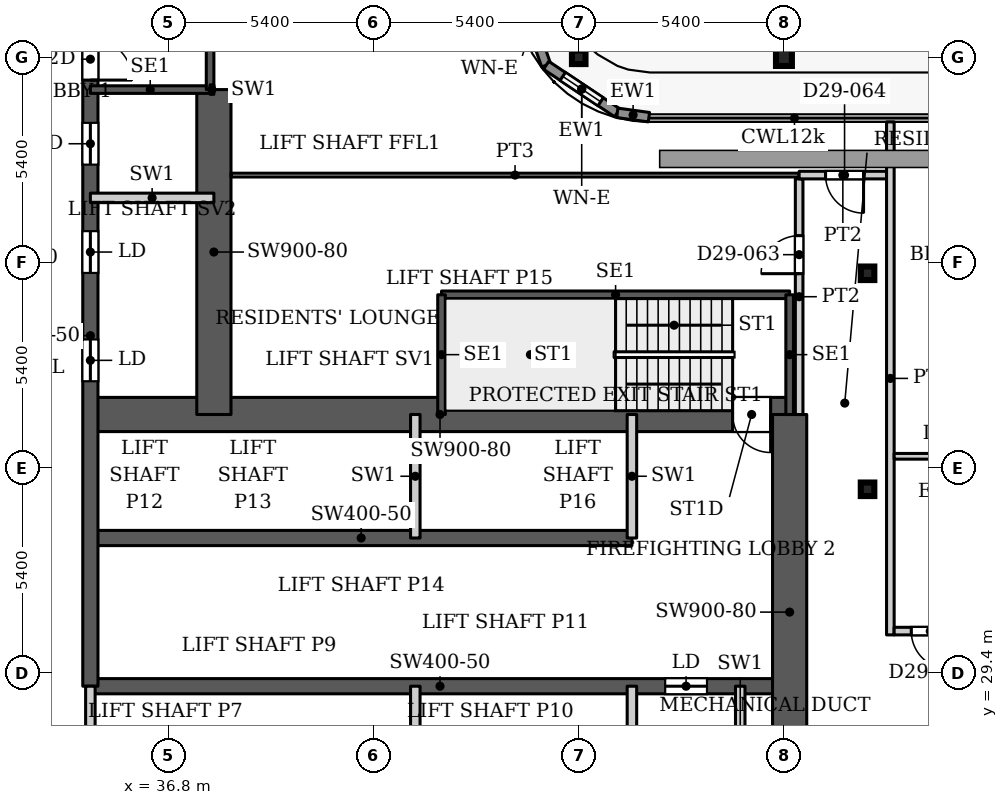
"""IFC4 building model, lengths in metres.
Left out: names, types, materials, properties, quantities, classifications, styles, units other than length and angle.
Written with IfcOpenShell. Run it as: python <this file> out.ifc"""

import sys

from ifc_helpers import new_model, si_unit, direction, frame, frame_2d, origin, origin_2d, place, context, subcontext, project, spatial, rectangle, hollow_rectangle, i_section, extrude, source, transform, mapped, element, fill, save


model = new_model("IFC4")
c1 = context("Model", 3, precision=1e-05, world=origin(), true_north=direction((0.0, 1.0)))
c2 = subcontext(c1, "Body", "Model", "MODEL_VIEW")
j1 = project(units=[si_unit("LENGTHUNIT", "METRE"), si_unit("PLANEANGLEUNIT", "RADIAN")], contexts=[c1])
p1 = place(None, origin())
s1 = spatial("IfcSite", under=j1, at=p1, CompositionType="ELEMENT")
p2 = place(p1, origin())
s2 = spatial("IfcBuilding", under=s1, at=p2, CompositionType="ELEMENT")
p3 = place(p2, frame((0.0, 0.0, 125.3)))
s3 = spatial("IfcBuildingStorey", under=s2, at=p3, CompositionType="ELEMENT", Elevation=125.3)
p4 = place(p3, frame((53.0, 45.6, 0.0), z_axis=(0.0, 0.0, 1.0), x_axis=(1.0, 0.0, 0.0)))
e1 = element("IfcColumn", 1, at=p4, inside=s3, PredefinedType="COLUMN", context=c2, shape_type="SweptSolid", body=[
    extrude(i_section(OverallWidth=0.418, OverallDepth=0.455, WebThickness=0.042, FlangeThickness=0.068, FilletRadius=0.014, at=origin_2d()), origin(), (0.0, 0.0, 1.0), 3.9),
])
for number, where, z_axis, x_axis in (
    (2, (55.2, 34.232, 0.0), (0.0, 0.0, 1.0), (1.0, 0.0, 0.0)),
    (3, (55.2, 39.916, 0.0), (0.0, 0.0, 1.0), (1.0, 0.0, 0.0)),
    (4, (47.6, 45.6, 0.0), (0.0, 0.0, 1.0), (1.0, 0.0, 0.0)),
):
    element("IfcColumn", number, at=place(p3, frame(where, z_axis=z_axis, x_axis=x_axis)), inside=s3, PredefinedType="COLUMN", context=c2, shape_type="SweptSolid", body=[
        extrude(hollow_rectangle(XDim=0.356, YDim=0.356, WallThickness=0.016, InnerFilletRadius=0.016, OuterFilletRadius=0.032, at=origin_2d()), origin(), (0.0, 0.0, 1.0), 3.9),
    ])
p5 = place(p3, frame((34.75, 29.05, 0.0), z_axis=(0.0, 0.0, 1.0), x_axis=(1.0, 0.0, 0.0)))
e5 = element("IfcWall", 5, at=p5, inside=s3, PredefinedType="SHEAR", context=c2, shape_type="SweptSolid", body=[
    extrude(rectangle(XDim=18.4, YDim=0.4, at=frame_2d((9.2, 0.0))), origin(), (0.0, 0.0, 1.0), 3.9),
])
p6 = place(p5, frame((15.125, 0.0, 0.0)))
e6 = element("IfcOpeningElement", 6, at=p6, cuts=e5, PredefinedType="OPENING", context=c2, shape_type="SweptSolid", body=[
    extrude(rectangle(XDim=1.1, YDim=2.2, at=frame_2d((0.55, 1.1))), frame((0.0, 0.21, 0.0), z_axis=(0.0, -1.0, 0.0), x_axis=(1.0, 0.0, 0.0)), (0.0, 0.0, 1.0), 0.42),
])
p7 = place(p3, frame((34.75, 32.95, 0.0), z_axis=(0.0, 0.0, 1.0), x_axis=(1.0, 0.0, 0.0)))
e7 = element("IfcWall", 7, at=p7, inside=s3, PredefinedType="SHEAR", context=c2, shape_type="SweptSolid", body=[
    extrude(rectangle(XDim=14.25, YDim=0.4, at=frame_2d((7.125, 0.0))), origin(), (0.0, 0.0, 1.0), 3.9),
])
p8 = place(p3, frame((34.75, 36.2, 0.0), z_axis=(0.0, 0.0, 1.0), x_axis=(1.0, 0.0, 0.0)))
e8 = element("IfcWall", 8, at=p8, inside=s3, PredefinedType="SHEAR", context=c2, shape_type="SweptSolid", body=[
    extrude(rectangle(XDim=18.4, YDim=0.9, at=frame_2d((9.2, 0.0))), origin(), (0.0, 0.0, 1.0), 3.9),
])
p9 = place(p8, frame((16.9, 0.0, 0.0)))
e9 = element("IfcOpeningElement", 9, at=p9, cuts=e8, PredefinedType="OPENING", context=c2, shape_type="SweptSolid", body=[
    extrude(rectangle(XDim=1.0, YDim=2.2, at=frame_2d((0.5, 1.1))), frame((0.0, 0.46, 0.0), z_axis=(0.0, -1.0, 0.0), x_axis=(1.0, 0.0, 0.0)), (0.0, 0.0, 1.0), 0.92),
])
p10 = place(p3, frame((34.75, 29.05, 0.0), z_axis=(0.0, 0.0, 1.0), x_axis=(0.0, 1.0, 0.0)))
e10 = element("IfcWall", 10, at=p10, inside=s3, PredefinedType="SHEAR", context=c2, shape_type="SweptSolid", body=[
    extrude(rectangle(XDim=18.45, YDim=0.4, at=frame_2d((9.225, 0.0))), origin(), (0.0, 0.0, 1.0), 3.9),
])
p11 = place(p10, frame((8.025, 0.0, 0.0)))
e11 = element("IfcOpeningElement", 11, at=p11, cuts=e10, PredefinedType="OPENING", context=c2, shape_type="SweptSolid", body=[
    extrude(rectangle(XDim=1.1, YDim=2.2, at=frame_2d((0.55, 1.1))), frame((0.0, 0.21, 0.0), z_axis=(0.0, -1.0, 0.0), x_axis=(1.0, 0.0, 0.0)), (0.0, 0.0, 1.0), 0.42),
])
p12 = place(p10, frame((10.875, 0.0, 0.0)))
e12 = element("IfcOpeningElement", 12, at=p12, cuts=e10, PredefinedType="OPENING", context=c2, shape_type="SweptSolid", body=[
    extrude(rectangle(XDim=1.1, YDim=2.2, at=frame_2d((0.55, 1.1))), frame((0.0, 0.21, 0.0), z_axis=(0.0, -1.0, 0.0), x_axis=(1.0, 0.0, 0.0)), (0.0, 0.0, 1.0), 0.42),
])
p13 = place(p10, frame((13.725, 0.0, 0.0)))
e13 = element("IfcOpeningElement", 13, at=p13, cuts=e10, PredefinedType="OPENING", context=c2, shape_type="SweptSolid", body=[
    extrude(rectangle(XDim=1.1, YDim=2.2, at=frame_2d((0.55, 1.1))), frame((0.0, 0.21, 0.0), z_axis=(0.0, -1.0, 0.0), x_axis=(1.0, 0.0, 0.0)), (0.0, 0.0, 1.0), 0.42),
])
p14 = place(p10, frame((15.95, 0.0, 0.0)))
e14 = element("IfcOpeningElement", 14, at=p14, cuts=e10, PredefinedType="OPENING", context=c2, shape_type="SweptSolid", body=[
    extrude(rectangle(XDim=1.1, YDim=2.2, at=frame_2d((0.55, 1.1))), frame((0.0, 0.21, 0.0), z_axis=(0.0, -1.0, 0.0), x_axis=(1.0, 0.0, 0.0)), (0.0, 0.0, 1.0), 0.42),
])
p15 = place(p3, frame((38.0, 36.2, 0.0), z_axis=(0.0, 0.0, 1.0), x_axis=(0.0, 1.0, 0.0)))
e15 = element("IfcWall", 15, at=p15, inside=s3, PredefinedType="SHEAR", context=c2, shape_type="SweptSolid", body=[
    extrude(rectangle(XDim=8.55, YDim=0.9, at=frame_2d((4.275, 0.0))), origin(), (0.0, 0.0, 1.0), 3.9),
])
p16 = place(p3, frame((53.15, 25.8, 0.0), z_axis=(0.0, 0.0, 1.0), x_axis=(0.0, 1.0, 0.0)))
e16 = element("IfcWall", 16, at=p16, inside=s3, PredefinedType="SHEAR", context=c2, shape_type="SweptSolid", body=[
    extrude(rectangle(XDim=10.4, YDim=0.9, at=frame_2d((5.2, 0.0))), origin(), (0.0, 0.0, 1.0), 3.9),
])
p17 = place(p3, frame((46.018, 47.471, 0.0), z_axis=(0.0, 0.0, 1.0), x_axis=(0.328791208903, -0.944402637093, 0.0)))
e17 = element("IfcWall", 17, at=p17, inside=s3, PredefinedType="SOLIDWALL", context=c2, shape_type="SweptSolid", body=[
    extrude(rectangle(XDim=2.205, YDim=0.25, at=frame_2d((1.102, 0.0))), origin(), (0.0, 0.0, 1.0), 3.75),
])
p18 = place(p17, frame((0.503, 0.0, 0.6)))
e18 = element("IfcOpeningElement", 18, at=p18, cuts=e17, PredefinedType="OPENING", context=c2, shape_type="SweptSolid", body=[
    extrude(rectangle(XDim=1.2, YDim=2.1, at=frame_2d((0.6, 1.05))), frame((0.0, 0.135, 0.0), z_axis=(0.0, -1.0, 0.0), x_axis=(1.0, 0.0, 0.0)), (0.0, 0.0, 1.0), 0.27),
])
p19 = place(p3, frame((46.743, 45.389, 0.0), z_axis=(0.0, 0.0, 1.0), x_axis=(0.831449265529, -0.555600682912, 0.0)))
e19 = element("IfcWall", 19, at=p19, inside=s3, PredefinedType="SOLIDWALL", context=c2, shape_type="SweptSolid", body=[
    extrude(rectangle(XDim=2.251, YDim=0.25, at=frame_2d((1.126, 0.0))), origin(), (0.0, 0.0, 1.0), 3.75),
])
p20 = place(p19, frame((0.525, 0.0, 0.6)))
e20 = element("IfcOpeningElement", 20, at=p20, cuts=e19, PredefinedType="OPENING", context=c2, shape_type="SweptSolid", body=[
    extrude(rectangle(XDim=1.2, YDim=2.1, at=frame_2d((0.6, 1.05))), frame((0.0, 0.135, 0.0), z_axis=(0.0, -1.0, 0.0), x_axis=(1.0, 0.0, 0.0)), (0.0, 0.0, 1.0), 0.27),
])
p21 = place(p3, frame((48.615, 44.138, 0.0), z_axis=(0.0, 0.0, 1.0), x_axis=(0.990741504246, -0.135761819977, 0.0)))
e21 = element("IfcWall", 21, at=p21, inside=s3, PredefinedType="SOLIDWALL", context=c2, shape_type="SweptSolid", body=[
    extrude(rectangle(XDim=0.84, YDim=0.25, at=frame_2d((0.42, 0.0))), origin(), (0.0, 0.0, 1.0), 3.75),
])
p22 = place(p3, frame((43.99, 39.35, 0.0), z_axis=(0.0, 0.0, 1.0), x_axis=(1.0, 0.0, 0.0)))
e22 = element("IfcWall", 22, at=p22, inside=s3, PredefinedType="SHEAR", context=c2, shape_type="SweptSolid", body=[
    extrude(rectangle(XDim=9.16, YDim=0.2, at=frame_2d((4.58, 0.0))), origin(), (0.0, 0.0, 1.0), 3.9),
])
for number, where, z_axis, x_axis in (
    (23, (43.99, 36.2, 0.0), (0.0, 0.0, 1.0), (0.0, 1.0, 0.0)),
    (24, (53.15, 36.2, 0.0), (0.0, 0.0, 1.0), (0.0, 1.0, 0.0)),
):
    element("IfcWall", number, at=place(p3, frame(where, z_axis=z_axis, x_axis=x_axis)), inside=s3, PredefinedType="SHEAR", context=c2, shape_type="SweptSolid", body=[
        extrude(rectangle(XDim=3.15, YDim=0.2, at=frame_2d((1.575, 0.0))), origin(), (0.0, 0.0, 1.0), 3.9),
    ])
p23 = place(p3, frame((34.75, 44.75, 0.0), z_axis=(0.0, 0.0, 1.0), x_axis=(1.0, 0.0, 0.0)))
e25 = element("IfcWall", 25, at=p23, inside=s3, PredefinedType="SHEAR", context=c2, shape_type="SweptSolid", body=[
    extrude(rectangle(XDim=3.15, YDim=0.2, at=frame_2d((1.575, 0.0))), origin(), (0.0, 0.0, 1.0), 3.9),
])
p24 = place(p3, frame((37.9, 44.75, 0.0), z_axis=(0.0, 0.0, 1.0), x_axis=(0.0, 1.0, 0.0)))
e26 = element("IfcWall", 26, at=p24, inside=s3, PredefinedType="SHEAR", context=c2, shape_type="SweptSolid", body=[
    extrude(rectangle(XDim=9.16, YDim=0.2, at=frame_2d((4.58, 0.0))), origin(), (0.0, 0.0, 1.0), 3.9),
])
for number, where, z_axis, x_axis in (
    (27, (34.75, 25.8, 0.0), (0.0, 0.0, 1.0), (0.0, 1.0, 0.0)),
    (28, (43.3, 25.8, 0.0), (0.0, 0.0, 1.0), (0.0, 1.0, 0.0)),
    (29, (43.3, 32.95, 0.0), (0.0, 0.0, 1.0), (0.0, 1.0, 0.0)),
    (30, (49.0, 25.8, 0.0), (0.0, 0.0, 1.0), (0.0, 1.0, 0.0)),
    (31, (49.0, 32.95, 0.0), (0.0, 0.0, 1.0), (0.0, 1.0, 0.0)),
    (32, (51.85, 25.8, 0.0), (0.0, 0.0, 1.0), (0.0, 1.0, 0.0)),
    (33, (34.75, 41.9, 0.0), (0.0, 0.0, 1.0), (1.0, 0.0, 0.0)),
):
    element("IfcWall", number, at=place(p3, frame(where, z_axis=z_axis, x_axis=x_axis)), inside=s3, PredefinedType="PARTITIONING", context=c2, shape_type="SweptSolid", body=[
        extrude(rectangle(XDim=3.25, YDim=0.25, at=frame_2d((1.625, 0.0))), origin(), (0.0, 0.0, 1.0), 3.9),
    ])
p25 = place(p3, frame((37.9, 44.75, 0.0), z_axis=(0.0, 0.0, 1.0), x_axis=(1.0, 0.0, 0.0)))
e34 = element("IfcWall", 34, at=p25, inside=s3, PredefinedType="PARTITIONING", context=c2, shape_type="SweptSolid", body=[
    extrude(rectangle(XDim=0.1, YDim=0.25, at=frame_2d((0.05, 0.0))), origin(), (0.0, 0.0, 1.0), 3.9),
])
p26 = place(p3, frame((38.449, 42.5, 0.0), z_axis=(0.0, 0.0, 1.0), x_axis=(1.0, 0.0, 0.0)))
e35 = element("IfcWall", 35, at=p26, inside=s3, PredefinedType="PARTITIONING", context=c2, shape_type="SweptSolid", body=[
    extrude(rectangle(XDim=14.951, YDim=0.1, at=frame_2d((7.476, 0.0))), origin(), (0.0, 0.0, 1.0), 3.6),
])
p27 = place(p3, frame((53.4, 36.199, 0.0), z_axis=(0.0, 0.0, 1.0), x_axis=(0.0, 1.0, 0.0)))
e36 = element("IfcWall", 36, at=p27, inside=s3, PredefinedType="PARTITIONING", context=c2, shape_type="SweptSolid", body=[
    extrude(rectangle(XDim=6.201, YDim=0.2, at=frame_2d((3.101, 0.0))), origin(), (0.0, 0.0, 1.0), 3.6),
])
p28 = place(p27, frame((3.707, 0.0, 0.0)))
e37 = element("IfcOpeningElement", 37, at=p28, cuts=e36, PredefinedType="OPENING", context=c2, shape_type="SweptSolid", body=[
    extrude(rectangle(XDim=1.0, YDim=2.1, at=frame_2d((0.5, 1.05))), frame((0.0, 0.11, 0.0), z_axis=(0.0, -1.0, 0.0), x_axis=(1.0, 0.0, 0.0)), (0.0, 0.0, 1.0), 0.22),
])
p29 = place(p3, frame((53.4, 42.5, 0.0), z_axis=(0.0, 0.0, 1.0), x_axis=(1.0, 0.0, 0.0)))
e38 = element("IfcWall", 38, at=p29, inside=s3, PredefinedType="PARTITIONING", context=c2, shape_type="SweptSolid", body=[
    extrude(rectangle(XDim=2.3, YDim=0.2, at=frame_2d((1.15, 0.0))), origin(), (0.0, 0.0, 1.0), 3.6),
])
p30 = place(p29, frame((0.695, 0.0, 0.0)))
e39 = element("IfcOpeningElement", 39, at=p30, cuts=e38, PredefinedType="OPENING", context=c2, shape_type="SweptSolid", body=[
    extrude(rectangle(XDim=1.0, YDim=2.1, at=frame_2d((0.5, 1.05))), frame((0.0, 0.11, 0.0), z_axis=(0.0, -1.0, 0.0), x_axis=(1.0, 0.0, 0.0)), (0.0, 0.0, 1.0), 0.22),
])
p31 = place(p3, frame((55.8, 30.4, 0.0), z_axis=(0.0, 0.0, 1.0), x_axis=(0.0, 1.0, 0.0)))
e40 = element("IfcWall", 40, at=p31, inside=s3, PredefinedType="PARTITIONING", context=c2, shape_type="SweptSolid", body=[
    extrude(rectangle(XDim=13.5, YDim=0.2, at=frame_2d((6.75, 0.0))), origin(), (0.0, 0.0, 1.0), 3.6),
])
p32 = place(p3, frame((55.9, 30.5, 0.0), z_axis=(0.0, 0.0, 1.0), x_axis=(1.0, 0.0, 0.0)))
e41 = element("IfcWall", 41, at=p32, inside=s3, PredefinedType="PARTITIONING", context=c2, shape_type="SweptSolid", body=[
    extrude(rectangle(XDim=42.2, YDim=0.2, at=frame_2d((21.1, 0.0))), origin(), (0.0, 0.0, 1.0), 3.6),
])
p33 = place(p32, frame((0.45, 0.0, 0.0)))
e42 = element("IfcOpeningElement", 42, at=p33, cuts=e41, PredefinedType="OPENING", context=c2, shape_type="SweptSolid", body=[
    extrude(rectangle(XDim=1.0, YDim=2.1, at=frame_2d((0.5, 1.05))), frame((0.0, 0.11, 0.0), z_axis=(0.0, -1.0, 0.0), x_axis=(1.0, 0.0, 0.0)), (0.0, 0.0, 1.0), 0.22),
])
p34 = place(p32, frame((20.1, 0.0, 0.0)))
e43 = element("IfcOpeningElement", 43, at=p34, cuts=e41, PredefinedType="OPENING", context=c2, shape_type="SweptSolid", body=[
    extrude(rectangle(XDim=1.0, YDim=2.1, at=frame_2d((0.5, 1.05))), frame((0.0, 0.11, 0.0), z_axis=(0.0, -1.0, 0.0), x_axis=(1.0, 0.0, 0.0)), (0.0, 0.0, 1.0), 0.22),
])
p35 = place(p32, frame((33.75, 0.0, 0.0)))
e44 = element("IfcOpeningElement", 44, at=p35, cuts=e41, PredefinedType="OPENING", context=c2, shape_type="SweptSolid", body=[
    extrude(rectangle(XDim=1.0, YDim=2.1, at=frame_2d((0.5, 1.05))), frame((0.0, 0.11, 0.0), z_axis=(0.0, -1.0, 0.0), x_axis=(1.0, 0.0, 0.0)), (0.0, 0.0, 1.0), 0.22),
])
p36 = place(p32, frame((38.7, 0.0, 0.0)))
e45 = element("IfcOpeningElement", 45, at=p36, cuts=e41, PredefinedType="OPENING", context=c2, shape_type="SweptSolid", body=[
    extrude(rectangle(XDim=1.0, YDim=2.1, at=frame_2d((0.5, 1.05))), frame((0.0, 0.11, 0.0), z_axis=(0.0, -1.0, 0.0), x_axis=(1.0, 0.0, 0.0)), (0.0, 0.0, 1.0), 0.22),
])
p37 = place(p3, frame((55.9, 35.1, 0.0), z_axis=(0.0, 0.0, 1.0), x_axis=(1.0, 0.0, 0.0)))
e46 = element("IfcWall", 46, at=p37, inside=s3, PredefinedType="PARTITIONING", context=c2, shape_type="SweptSolid", body=[
    extrude(rectangle(XDim=9.7, YDim=0.15, at=frame_2d((4.85, 0.0))), origin(), (0.0, 0.0, 1.0), 3.6),
])
p38 = place(p37, frame((1.4, 0.0, 0.0)))
e47 = element("IfcOpeningElement", 47, at=p38, cuts=e46, PredefinedType="OPENING", context=c2, shape_type="SweptSolid", body=[
    extrude(rectangle(XDim=0.9, YDim=2.1, at=frame_2d((0.45, 1.05))), frame((0.0, 0.085, 0.0), z_axis=(0.0, -1.0, 0.0), x_axis=(1.0, 0.0, 0.0)), (0.0, 0.0, 1.0), 0.17),
])
p39 = place(p37, frame((6.3, 0.0, 0.0)))
e48 = element("IfcOpeningElement", 48, at=p39, cuts=e46, PredefinedType="OPENING", context=c2, shape_type="SweptSolid", body=[
    extrude(rectangle(XDim=1.0, YDim=2.1, at=frame_2d((0.5, 1.05))), frame((0.0, 0.085, 0.0), z_axis=(0.0, -1.0, 0.0), x_axis=(1.0, 0.0, 0.0)), (0.0, 0.0, 1.0), 0.17),
])
m1 = source(origin(), c2, "Body", "SweptSolid", [
    extrude(rectangle(XDim=1.2, YDim=2.1, at=frame_2d((0.6, 1.05))), frame((0.0, 0.03, 0.0), z_axis=(0.0, -1.0, 0.0), x_axis=(1.0, 0.0, 0.0)), (0.0, 0.0, 1.0), 0.06),
])
p40 = place(p20, origin())
e49 = element("IfcWindow", 49, at=p40, inside=s3, PartitioningType="SINGLE_PANEL", PredefinedType="WINDOW", context=c2, shape_type="MappedRepresentation", body=[
    mapped(m1, transform((0.0, 0.0, 0.0), x_axis=(1.0, 0.0, 0.0), y_axis=(0.0, 1.0, 0.0), z_axis=(0.0, 0.0, 1.0), scale=1.0)),
])
fill(e20, e49)
m2 = source(origin(), c2, "Body", "SweptSolid", [
    extrude(rectangle(XDim=1.1, YDim=2.2, at=frame_2d((0.55, 1.1))), frame((0.0, 0.025, 0.0), z_axis=(0.0, -1.0, 0.0), x_axis=(1.0, 0.0, 0.0)), (0.0, 0.0, 1.0), 0.05),
])
p41 = place(p11, origin())
e50 = element("IfcDoor", 50, at=p41, inside=s3, OperationType="SLIDING_TO_LEFT", PredefinedType="DOOR", context=c2, shape_type="MappedRepresentation", body=[
    mapped(m2, transform((0.0, 0.0, 0.0), x_axis=(1.0, 0.0, 0.0), y_axis=(0.0, 1.0, 0.0), z_axis=(0.0, 0.0, 1.0), scale=1.0)),
])
fill(e11, e50)
p42 = place(p12, origin())
e51 = element("IfcDoor", 51, at=p42, inside=s3, OperationType="SLIDING_TO_LEFT", PredefinedType="DOOR", context=c2, shape_type="MappedRepresentation", body=[
    mapped(m2, transform((0.0, 0.0, 0.0), x_axis=(1.0, 0.0, 0.0), y_axis=(0.0, 1.0, 0.0), z_axis=(0.0, 0.0, 1.0), scale=1.0)),
])
fill(e12, e51)
p43 = place(p13, origin())
e52 = element("IfcDoor", 52, at=p43, inside=s3, OperationType="SLIDING_TO_LEFT", PredefinedType="DOOR", context=c2, shape_type="MappedRepresentation", body=[
    mapped(m2, transform((0.0, 0.0, 0.0), x_axis=(1.0, 0.0, 0.0), y_axis=(0.0, 1.0, 0.0), z_axis=(0.0, 0.0, 1.0), scale=1.0)),
])
fill(e13, e52)
p44 = place(p6, origin())
e53 = element("IfcDoor", 53, at=p44, inside=s3, OperationType="SLIDING_TO_LEFT", PredefinedType="DOOR", context=c2, shape_type="MappedRepresentation", body=[
    mapped(m2, transform((0.0, 0.0, 0.0), x_axis=(1.0, 0.0, 0.0), y_axis=(0.0, 1.0, 0.0), z_axis=(0.0, 0.0, 1.0), scale=1.0)),
])
fill(e6, e53)
m3 = source(origin(), c2, "Body", "SweptSolid", [
    extrude(rectangle(XDim=1.0, YDim=2.2, at=frame_2d((0.5, 1.1))), frame((0.0, 0.025, 0.0), z_axis=(0.0, -1.0, 0.0), x_axis=(1.0, 0.0, 0.0)), (0.0, 0.0, 1.0), 0.05),
])
p45 = place(p9, origin())
e54 = element("IfcDoor", 54, at=p45, inside=s3, OperationType="SINGLE_SWING_RIGHT", PredefinedType="DOOR", context=c2, shape_type="MappedRepresentation", body=[
    mapped(m3, transform((0.0, 0.0, 0.0), x_axis=(1.0, 0.0, 0.0), y_axis=(0.0, 1.0, 0.0), z_axis=(0.0, 0.0, 1.0), scale=1.0)),
])
fill(e9, e54)
m4 = source(origin(), c2, "Body", "SweptSolid", [
    extrude(rectangle(XDim=1.1, YDim=2.2, at=frame_2d((0.55, 1.1))), frame((0.0, 0.025, 0.0), z_axis=(0.0, -1.0, 0.0), x_axis=(1.0, 0.0, 0.0)), (0.0, 0.0, 1.0), 0.05),
])
p46 = place(p14, origin())
e55 = element("IfcDoor", 55, at=p46, inside=s3, OperationType="SINGLE_SWING_RIGHT", PredefinedType="DOOR", context=c2, shape_type="MappedRepresentation", body=[
    mapped(m4, transform((0.0, 0.0, 0.0), x_axis=(1.0, 0.0, 0.0), y_axis=(0.0, 1.0, 0.0), z_axis=(0.0, 0.0, 1.0), scale=1.0)),
])
fill(e14, e55)
m5 = source(origin(), c2, "Body", "SweptSolid", [
    extrude(rectangle(XDim=1.0, YDim=2.1, at=frame_2d((0.5, 1.05))), frame((0.0, 0.025, 0.0), z_axis=(0.0, -1.0, 0.0), x_axis=(1.0, 0.0, 0.0)), (0.0, 0.0, 1.0), 0.05),
])
p47 = place(p33, origin())
e56 = element("IfcDoor", 56, at=p47, inside=s3, OperationType="SINGLE_SWING_RIGHT", PredefinedType="DOOR", context=c2, shape_type="MappedRepresentation", body=[
    mapped(m5, transform((0.0, 0.0, 0.0), x_axis=(1.0, 0.0, 0.0), y_axis=(0.0, 1.0, 0.0), z_axis=(0.0, 0.0, 1.0), scale=1.0)),
])
fill(e42, e56)
m6 = source(origin(), c2, "Body", "SweptSolid", [
    extrude(rectangle(XDim=1.0, YDim=2.1, at=frame_2d((0.5, 1.05))), frame((0.0, 0.025, 0.0), z_axis=(0.0, -1.0, 0.0), x_axis=(1.0, 0.0, 0.0)), (0.0, 0.0, 1.0), 0.05),
])
p48 = place(p28, origin())
e57 = element("IfcDoor", 57, at=p48, inside=s3, OperationType="SINGLE_SWING_LEFT", PredefinedType="DOOR", context=c2, shape_type="MappedRepresentation", body=[
    mapped(m6, transform((0.0, 0.0, 0.0), x_axis=(1.0, 0.0, 0.0), y_axis=(0.0, 1.0, 0.0), z_axis=(0.0, 0.0, 1.0), scale=1.0)),
])
fill(e37, e57)
p49 = place(p30, origin())
e58 = element("IfcDoor", 58, at=p49, inside=s3, OperationType="SINGLE_SWING_RIGHT", PredefinedType="DOOR", context=c2, shape_type="MappedRepresentation", body=[
    mapped(m6, transform((0.0, 0.0, 0.0), x_axis=(1.0, 0.0, 0.0), y_axis=(0.0, 1.0, 0.0), z_axis=(0.0, 0.0, 1.0), scale=1.0)),
])
fill(e39, e58)
save(model, sys.argv[1])
